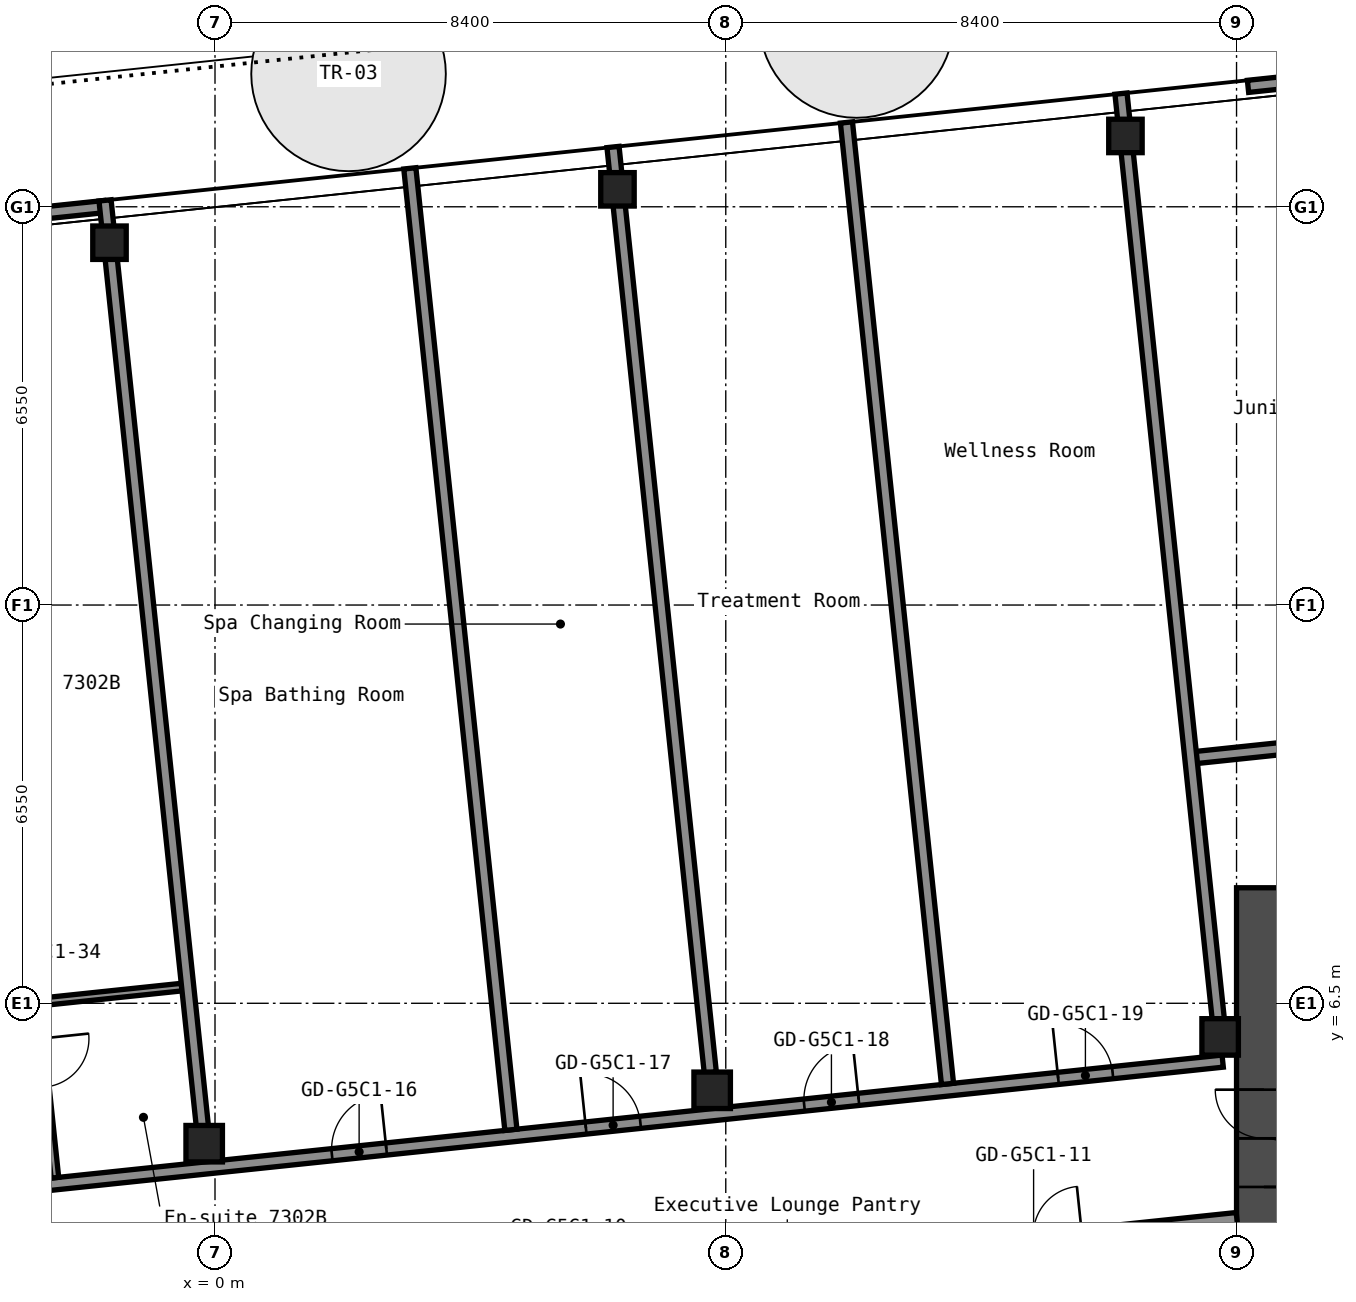
"""IFC4 building model, lengths in metres.
Left out: names, types, materials, properties, quantities, classifications, styles, units other than length and angle.
Written with IfcOpenShell. Run it as: python <this file> out.ifc"""

import sys

from ifc_helpers import new_model, si_unit, direction, frame, frame_2d, origin, origin_2d, place, context, subcontext, project, spatial, rectangle, hollow_rectangle, extrude, element, fill, save


model = new_model("IFC4")
c1 = context("Model", 3, precision=1e-05, world=origin(), true_north=direction((0.0, 1.0)))
c2 = subcontext(c1, "Body", "Model", "MODEL_VIEW")
j1 = project(units=[si_unit("LENGTHUNIT", "METRE"), si_unit("PLANEANGLEUNIT", "RADIAN")], contexts=[c1])
p1 = place(None, origin())
s1 = spatial("IfcSite", under=j1, at=p1, CompositionType="ELEMENT")
p2 = place(p1, origin())
s2 = spatial("IfcBuilding", under=s1, at=p2, CompositionType="ELEMENT")
p3 = place(p2, frame((0.0, 0.0, 258.2)))
s3 = spatial("IfcBuildingStorey", under=s2, at=p3, CompositionType="ELEMENT", Elevation=258.2)
p4 = place(p3, frame((-0.178, 4.191, 0.0), z_axis=(0.0, 0.0, 1.0), x_axis=(1.0, 0.0, 0.0)))
e1 = element("IfcColumn", 1, at=p4, inside=s3, PredefinedType="COLUMN", context=c2, shape_type="SweptSolid", body=[
    extrude(hollow_rectangle(XDim=0.6, YDim=0.6, WallThickness=0.025, InnerFilletRadius=0.038, OuterFilletRadius=0.062, at=origin_2d()), origin(), (0.0, 0.0, 1.0), 2.75),
])
p5 = place(p3, frame((-1.735, 19.009, 0.0), z_axis=(0.0, 0.0, 1.0), x_axis=(1.0, 0.0, 0.0)))
e2 = element("IfcColumn", 2, at=p5, inside=s3, PredefinedType="COLUMN", context=c2, shape_type="SweptSolid", body=[
    extrude(hollow_rectangle(XDim=0.55, YDim=0.55, WallThickness=0.022, InnerFilletRadius=0.033, OuterFilletRadius=0.055, at=origin_2d()), origin(), (0.0, 0.0, 1.0), 2.75),
])
p6 = place(p3, frame((8.176, 5.069, 0.0), z_axis=(0.0, 0.0, 1.0), x_axis=(1.0, 0.0, 0.0)))
e3 = element("IfcColumn", 3, at=p6, inside=s3, PredefinedType="COLUMN", context=c2, shape_type="SweptSolid", body=[
    extrude(hollow_rectangle(XDim=0.6, YDim=0.6, WallThickness=0.025, InnerFilletRadius=0.038, OuterFilletRadius=0.062, at=origin_2d()), origin(), (0.0, 0.0, 1.0), 2.75),
])
p7 = place(p3, frame((6.619, 19.887, 0.0), z_axis=(0.0, 0.0, 1.0), x_axis=(1.0, 0.0, 0.0)))
e4 = element("IfcColumn", 4, at=p7, inside=s3, PredefinedType="COLUMN", context=c2, shape_type="SweptSolid", body=[
    extrude(hollow_rectangle(XDim=0.55, YDim=0.55, WallThickness=0.022, InnerFilletRadius=0.033, OuterFilletRadius=0.055, at=origin_2d()), origin(), (0.0, 0.0, 1.0), 2.75),
])
p8 = place(p3, frame((16.53, 5.947, 0.0), z_axis=(0.0, 0.0, 1.0), x_axis=(1.0, 0.0, 0.0)))
e5 = element("IfcColumn", 5, at=p8, inside=s3, PredefinedType="COLUMN", context=c2, shape_type="SweptSolid", body=[
    extrude(hollow_rectangle(XDim=0.6, YDim=0.6, WallThickness=0.025, InnerFilletRadius=0.038, OuterFilletRadius=0.062, at=origin_2d()), origin(), (0.0, 0.0, 1.0), 2.75),
])
p9 = place(p3, frame((14.973, 20.765, 0.0), z_axis=(0.0, 0.0, 1.0), x_axis=(1.0, 0.0, 0.0)))
e6 = element("IfcColumn", 6, at=p9, inside=s3, PredefinedType="COLUMN", context=c2, shape_type="SweptSolid", body=[
    extrude(hollow_rectangle(XDim=0.55, YDim=0.55, WallThickness=0.022, InnerFilletRadius=0.033, OuterFilletRadius=0.055, at=origin_2d()), origin(), (0.0, 0.0, 1.0), 2.75),
])
p10 = place(p3, frame((17.25, -8.4, 0.0), z_axis=(0.0, 0.0, 1.0), x_axis=(0.0, 1.0, 0.0)))
e7 = element("IfcWall", 7, at=p10, inside=s3, PredefinedType="SHEAR", context=c2, shape_type="SweptSolid", body=[
    extrude(rectangle(XDim=16.8, YDim=0.9, at=frame_2d((8.4, 0.0))), origin(), (0.0, 0.0, 1.0), 2.75),
])
p11 = place(p10, frame((11.879, 0.0, 0.0)))
e8 = element("IfcOpeningElement", 8, at=p11, cuts=e7, PredefinedType="OPENING", context=c2, shape_type="SweptSolid", body=[
    extrude(rectangle(XDim=1.6, YDim=2.1, at=frame_2d((0.8, 1.05))), frame((0.0, 0.46, 0.0), z_axis=(0.0, -1.0, 0.0), x_axis=(1.0, 0.0, 0.0)), (0.0, 0.0, 1.0), 0.92),
])
p12 = place(p3, frame((-16.572, -0.549, 0.0), z_axis=(0.0, 0.0, 1.0), x_axis=(0.994521146831, 0.104535584879, 0.0)))
e9 = element("IfcWall", 9, at=p12, inside=s3, PredefinedType="PARTITIONING", context=c2, shape_type="SweptSolid", body=[
    extrude(rectangle(XDim=33.561, YDim=0.2, at=frame_2d((16.78, 0.0))), origin(), (0.0, 0.0, 1.0), 2.75),
])
p13 = place(p12, frame((1.82, 0.0, 0.0)))
e10 = element("IfcOpeningElement", 10, at=p13, cuts=e9, PredefinedType="OPENING", context=c2, shape_type="SweptSolid", body=[
    extrude(rectangle(XDim=0.9, YDim=2.1, at=frame_2d((0.45, 1.05))), frame((0.0, 0.11, 0.0), z_axis=(0.0, -1.0, 0.0), x_axis=(1.0, 0.0, 0.0)), (0.0, 0.0, 1.0), 0.22),
])
p14 = place(p12, frame((6.02, 0.0, 0.0)))
e11 = element("IfcOpeningElement", 11, at=p14, cuts=e9, PredefinedType="OPENING", context=c2, shape_type="SweptSolid", body=[
    extrude(rectangle(XDim=0.9, YDim=2.1, at=frame_2d((0.45, 1.05))), frame((0.0, 0.11, 0.0), z_axis=(0.0, -1.0, 0.0), x_axis=(1.0, 0.0, 0.0)), (0.0, 0.0, 1.0), 0.22),
])
p15 = place(p12, frame((11.25, 0.0, 0.0)))
e12 = element("IfcOpeningElement", 12, at=p15, cuts=e9, PredefinedType="OPENING", context=c2, shape_type="SweptSolid", body=[
    extrude(rectangle(XDim=1.0, YDim=2.1, at=frame_2d((0.5, 1.05))), frame((0.0, 0.11, 0.0), z_axis=(0.0, -1.0, 0.0), x_axis=(1.0, 0.0, 0.0)), (0.0, 0.0, 1.0), 0.22),
])
p16 = place(p12, frame((12.95, 0.0, 0.0)))
e13 = element("IfcOpeningElement", 13, at=p16, cuts=e9, PredefinedType="OPENING", context=c2, shape_type="SweptSolid", body=[
    extrude(rectangle(XDim=1.0, YDim=2.1, at=frame_2d((0.5, 1.05))), frame((0.0, 0.11, 0.0), z_axis=(0.0, -1.0, 0.0), x_axis=(1.0, 0.0, 0.0)), (0.0, 0.0, 1.0), 0.22),
])
p17 = place(p12, frame((17.86, 0.0, 0.0)))
e14 = element("IfcOpeningElement", 14, at=p17, cuts=e9, PredefinedType="OPENING", context=c2, shape_type="SweptSolid", body=[
    extrude(rectangle(XDim=0.9, YDim=2.1, at=frame_2d((0.45, 1.05))), frame((0.0, 0.11, 0.0), z_axis=(0.0, -1.0, 0.0), x_axis=(1.0, 0.0, 0.0)), (0.0, 0.0, 1.0), 0.22),
])
p18 = place(p12, frame((22.06, 0.0, 0.0)))
e15 = element("IfcOpeningElement", 15, at=p18, cuts=e9, PredefinedType="OPENING", context=c2, shape_type="SweptSolid", body=[
    extrude(rectangle(XDim=0.9, YDim=2.1, at=frame_2d((0.45, 1.05))), frame((0.0, 0.11, 0.0), z_axis=(0.0, -1.0, 0.0), x_axis=(1.0, 0.0, 0.0)), (0.0, 0.0, 1.0), 0.22),
])
p19 = place(p12, frame((29.4, 0.0, 0.0)))
e16 = element("IfcOpeningElement", 16, at=p19, cuts=e9, PredefinedType="OPENING", context=c2, shape_type="SweptSolid", body=[
    extrude(rectangle(XDim=1.6, YDim=2.1, at=frame_2d((0.8, 1.05))), frame((0.0, 0.11, 0.0), z_axis=(0.0, -1.0, 0.0), x_axis=(1.0, 0.0, 0.0)), (0.0, 0.0, 1.0), 0.22),
])
p20 = place(p3, frame((-16.805, 2.041, 0.0), z_axis=(0.0, 0.0, 1.0), x_axis=(0.994521146831, 0.104535584879, 0.0)))
e17 = element("IfcWall", 17, at=p20, inside=s3, PredefinedType="PARTITIONING", context=c2, shape_type="SweptSolid", body=[
    extrude(rectangle(XDim=33.561, YDim=0.2, at=frame_2d((16.78, 0.0))), origin(), (0.0, 0.0, 1.0), 2.75),
])
p21 = place(p20, frame((1.276, 0.0, 0.0)))
e18 = element("IfcOpeningElement", 18, at=p21, cuts=e17, PredefinedType="OPENING", context=c2, shape_type="SweptSolid", body=[
    extrude(rectangle(XDim=0.9, YDim=2.1, at=frame_2d((0.45, 1.05))), frame((0.0, 0.11, 0.0), z_axis=(0.0, -1.0, 0.0), x_axis=(1.0, 0.0, 0.0)), (0.0, 0.0, 1.0), 0.22),
])
p22 = place(p20, frame((5.476, 0.0, 0.0)))
e19 = element("IfcOpeningElement", 19, at=p22, cuts=e17, PredefinedType="OPENING", context=c2, shape_type="SweptSolid", body=[
    extrude(rectangle(XDim=0.9, YDim=2.1, at=frame_2d((0.45, 1.05))), frame((0.0, 0.11, 0.0), z_axis=(0.0, -1.0, 0.0), x_axis=(1.0, 0.0, 0.0)), (0.0, 0.0, 1.0), 0.22),
])
p23 = place(p20, frame((11.211, 0.0, 0.0)))
e20 = element("IfcOpeningElement", 20, at=p23, cuts=e17, PredefinedType="OPENING", context=c2, shape_type="SweptSolid", body=[
    extrude(rectangle(XDim=1.0, YDim=2.1, at=frame_2d((0.5, 1.05))), frame((0.0, 0.11, 0.0), z_axis=(0.0, -1.0, 0.0), x_axis=(1.0, 0.0, 0.0)), (0.0, 0.0, 1.0), 0.22),
])
p24 = place(p20, frame((12.911, 0.0, 0.0)))
e21 = element("IfcOpeningElement", 21, at=p24, cuts=e17, PredefinedType="OPENING", context=c2, shape_type="SweptSolid", body=[
    extrude(rectangle(XDim=1.0, YDim=2.1, at=frame_2d((0.5, 1.05))), frame((0.0, 0.11, 0.0), z_axis=(0.0, -1.0, 0.0), x_axis=(1.0, 0.0, 0.0)), (0.0, 0.0, 1.0), 0.22),
])
p25 = place(p20, frame((18.831, 0.0, 0.0)))
e22 = element("IfcOpeningElement", 22, at=p25, cuts=e17, PredefinedType="OPENING", context=c2, shape_type="SweptSolid", body=[
    extrude(rectangle(XDim=0.9, YDim=2.1, at=frame_2d((0.45, 1.05))), frame((0.0, 0.11, 0.0), z_axis=(0.0, -1.0, 0.0), x_axis=(1.0, 0.0, 0.0)), (0.0, 0.0, 1.0), 0.22),
])
p26 = place(p20, frame((23.031, 0.0, 0.0)))
e23 = element("IfcOpeningElement", 23, at=p26, cuts=e17, PredefinedType="OPENING", context=c2, shape_type="SweptSolid", body=[
    extrude(rectangle(XDim=0.9, YDim=2.1, at=frame_2d((0.45, 1.05))), frame((0.0, 0.11, 0.0), z_axis=(0.0, -1.0, 0.0), x_axis=(1.0, 0.0, 0.0)), (0.0, 0.0, 1.0), 0.22),
])
p27 = place(p20, frame((26.641, 0.0, 0.0)))
e24 = element("IfcOpeningElement", 24, at=p27, cuts=e17, PredefinedType="OPENING", context=c2, shape_type="SweptSolid", body=[
    extrude(rectangle(XDim=0.9, YDim=2.1, at=frame_2d((0.45, 1.05))), frame((0.0, 0.11, 0.0), z_axis=(0.0, -1.0, 0.0), x_axis=(1.0, 0.0, 0.0)), (0.0, 0.0, 1.0), 0.22),
])
p28 = place(p20, frame((30.841, 0.0, 0.0)))
e25 = element("IfcOpeningElement", 25, at=p28, cuts=e17, PredefinedType="OPENING", context=c2, shape_type="SweptSolid", body=[
    extrude(rectangle(XDim=0.9, YDim=2.1, at=frame_2d((0.45, 1.05))), frame((0.0, 0.11, 0.0), z_axis=(0.0, -1.0, 0.0), x_axis=(1.0, 0.0, 0.0)), (0.0, 0.0, 1.0), 0.22),
])
p29 = place(p3, frame((-2.874, 6.522, 0.0), z_axis=(0.0, 0.0, 1.0), x_axis=(0.994519751088, 0.104548862722, 0.0)))
e26 = element("IfcWall", 26, at=p29, inside=s3, PredefinedType="PARTITIONING", context=c2, shape_type="SweptSolid", body=[
    extrude(rectangle(XDim=2.337, YDim=0.125, at=frame_2d((1.169, 0.0))), origin(), (0.0, 0.0, 1.0), 2.75),
])
p30 = place(p3, frame((16.048, 10.533, 0.0), z_axis=(0.0, 0.0, 1.0), x_axis=(0.994522460242, 0.104523088709, 0.0)))
e27 = element("IfcWall", 27, at=p30, inside=s3, PredefinedType="PARTITIONING", context=c2, shape_type="SweptSolid", body=[
    extrude(rectangle(XDim=21.3, YDim=0.2, at=frame_2d((10.65, 0.0))), origin(), (0.0, 0.0, 1.0), 2.75),
])
p31 = place(p30, frame((2.0, 0.0, 0.0)))
e28 = element("IfcOpeningElement", 28, at=p31, cuts=e27, PredefinedType="OPENING", context=c2, shape_type="SweptSolid", body=[
    extrude(rectangle(XDim=1.0, YDim=2.1, at=frame_2d((0.5, 1.05))), frame((0.0, 0.11, 0.0), z_axis=(0.0, -1.0, 0.0), x_axis=(1.0, 0.0, 0.0)), (0.0, 0.0, 1.0), 0.22),
])
p32 = place(p30, frame((11.25, 0.0, 0.0)))
e29 = element("IfcOpeningElement", 29, at=p32, cuts=e27, PredefinedType="OPENING", context=c2, shape_type="SweptSolid", body=[
    extrude(rectangle(XDim=1.0, YDim=2.1, at=frame_2d((0.5, 1.05))), frame((0.0, 0.11, 0.0), z_axis=(0.0, -1.0, 0.0), x_axis=(1.0, 0.0, 0.0)), (0.0, 0.0, 1.0), 0.22),
])
p33 = place(p30, frame((12.95, 0.0, 0.0)))
e30 = element("IfcOpeningElement", 30, at=p33, cuts=e27, PredefinedType="OPENING", context=c2, shape_type="SweptSolid", body=[
    extrude(rectangle(XDim=1.0, YDim=2.1, at=frame_2d((0.5, 1.05))), frame((0.0, 0.11, 0.0), z_axis=(0.0, -1.0, 0.0), x_axis=(1.0, 0.0, 0.0)), (0.0, 0.0, 1.0), 0.22),
])
p34 = place(p30, frame((19.65, 0.0, 0.0)))
e31 = element("IfcOpeningElement", 31, at=p34, cuts=e27, PredefinedType="OPENING", context=c2, shape_type="SweptSolid", body=[
    extrude(rectangle(XDim=1.0, YDim=2.1, at=frame_2d((0.5, 1.05))), frame((0.0, 0.11, 0.0), z_axis=(0.0, -1.0, 0.0), x_axis=(1.0, 0.0, 0.0)), (0.0, 0.0, 1.0), 0.22),
])
p35 = place(p3, frame((-2.633, 3.631, 0.0), z_axis=(0.0, 0.0, 1.0), x_axis=(-0.104562076147, 0.994518361938, 0.0)))
e32 = element("IfcWall", 32, at=p35, inside=s3, PredefinedType="PARTITIONING", context=c2, shape_type="SweptSolid", body=[
    extrude(rectangle(XDim=2.9, YDim=0.125, at=frame_2d((1.45, 0.0))), origin(), (0.0, 0.0, 1.0), 2.75),
])
p36 = place(p35, frame((1.5, 0.0, 0.0)))
e33 = element("IfcOpeningElement", 33, at=p36, cuts=e32, PredefinedType="OPENING", context=c2, shape_type="SweptSolid", body=[
    extrude(rectangle(XDim=0.8, YDim=2.1, at=frame_2d((0.4, 1.05))), frame((0.0, 0.073, 0.0), z_axis=(0.0, -1.0, 0.0), x_axis=(1.0, 0.0, 0.0)), (0.0, 0.0, 1.0), 0.145),
])
p37 = place(p3, frame((-0.208, 4.481, 0.0), z_axis=(0.0, 0.0, 1.0), x_axis=(-0.104523729364, 0.99452239291, 0.0)))
e34 = element("IfcWall", 34, at=p37, inside=s3, PredefinedType="PARTITIONING", context=c2, shape_type="SweptSolid", body=[
    extrude(rectangle(XDim=15.308, YDim=0.2, at=frame_2d((7.654, 0.0))), origin(), (0.0, 0.0, 1.0), 2.75),
])
p38 = place(p3, frame((4.866, 4.419, 0.0), z_axis=(0.0, 0.0, 1.0), x_axis=(-0.104520927191, 0.994522687413, 0.0)))
e35 = element("IfcWall", 35, at=p38, inside=s3, PredefinedType="PARTITIONING", context=c2, shape_type="SweptSolid", body=[
    extrude(rectangle(XDim=15.9, YDim=0.2, at=frame_2d((7.95, 0.0))), origin(), (0.0, 0.0, 1.0), 2.75),
])
p39 = place(p3, frame((8.146, 5.359, 0.0), z_axis=(0.0, 0.0, 1.0), x_axis=(-0.104523729364, 0.99452239291, 0.0)))
e36 = element("IfcWall", 36, at=p39, inside=s3, PredefinedType="PARTITIONING", context=c2, shape_type="SweptSolid", body=[
    extrude(rectangle(XDim=15.308, YDim=0.2, at=frame_2d((7.654, 0.0))), origin(), (0.0, 0.0, 1.0), 2.75),
])
p40 = place(p3, frame((12.046, 5.174, 0.0), z_axis=(0.0, 0.0, 1.0), x_axis=(-0.104519331095, 0.994522855156, 0.0)))
e37 = element("IfcWall", 37, at=p40, inside=s3, PredefinedType="PARTITIONING", context=c2, shape_type="SweptSolid", body=[
    extrude(rectangle(XDim=15.9, YDim=0.2, at=frame_2d((7.95, 0.0))), origin(), (0.0, 0.0, 1.0), 2.75),
])
p41 = place(p3, frame((16.5, 6.237, 0.0), z_axis=(0.0, 0.0, 1.0), x_axis=(-0.104523729364, 0.99452239291, 0.0)))
e38 = element("IfcWall", 38, at=p41, inside=s3, PredefinedType="PARTITIONING", context=c2, shape_type="SweptSolid", body=[
    extrude(rectangle(XDim=15.308, YDim=0.2, at=frame_2d((7.654, 0.0))), origin(), (0.0, 0.0, 1.0), 2.75),
])
p42 = place(p11, origin())
e39 = element("IfcDoor", 39, at=p42, inside=s3, OperationType="DOUBLE_DOOR_SINGLE_SWING", PredefinedType="DOOR", context=c2, shape_type="SweptSolid", body=[
    extrude(rectangle(XDim=1.6, YDim=2.1, at=frame_2d((0.8, 1.05))), frame((0.0, 0.025, 0.0), z_axis=(0.0, -1.0, 0.0), x_axis=(1.0, 0.0, 0.0)), (0.0, 0.0, 1.0), 0.05),
])
fill(e8, e39)
p43 = place(p25, origin())
e40 = element("IfcDoor", 40, at=p43, inside=s3, OperationType="SINGLE_SWING_LEFT", PredefinedType="DOOR", context=c2, shape_type="SweptSolid", body=[
    extrude(rectangle(XDim=0.9, YDim=2.1, at=frame_2d((0.45, 1.05))), frame((0.0, 0.025, 0.0), z_axis=(0.0, -1.0, 0.0), x_axis=(1.0, 0.0, 0.0)), (0.0, 0.0, 1.0), 0.05),
])
fill(e22, e40)
p44 = place(p26, origin())
e41 = element("IfcDoor", 41, at=p44, inside=s3, OperationType="SINGLE_SWING_RIGHT", PredefinedType="DOOR", context=c2, shape_type="SweptSolid", body=[
    extrude(rectangle(XDim=0.9, YDim=2.1, at=frame_2d((0.45, 1.05))), frame((0.0, 0.025, 0.0), z_axis=(0.0, -1.0, 0.0), x_axis=(1.0, 0.0, 0.0)), (0.0, 0.0, 1.0), 0.05),
])
fill(e23, e41)
p45 = place(p27, origin())
e42 = element("IfcDoor", 42, at=p45, inside=s3, OperationType="SINGLE_SWING_LEFT", PredefinedType="DOOR", context=c2, shape_type="SweptSolid", body=[
    extrude(rectangle(XDim=0.9, YDim=2.1, at=frame_2d((0.45, 1.05))), frame((0.0, 0.025, 0.0), z_axis=(0.0, -1.0, 0.0), x_axis=(1.0, 0.0, 0.0)), (0.0, 0.0, 1.0), 0.05),
])
fill(e24, e42)
p46 = place(p28, origin())
e43 = element("IfcDoor", 43, at=p46, inside=s3, OperationType="SINGLE_SWING_RIGHT", PredefinedType="DOOR", context=c2, shape_type="SweptSolid", body=[
    extrude(rectangle(XDim=0.9, YDim=2.1, at=frame_2d((0.45, 1.05))), frame((0.0, 0.025, 0.0), z_axis=(0.0, -1.0, 0.0), x_axis=(1.0, 0.0, 0.0)), (0.0, 0.0, 1.0), 0.05),
])
fill(e25, e43)
save(model, sys.argv[1])
